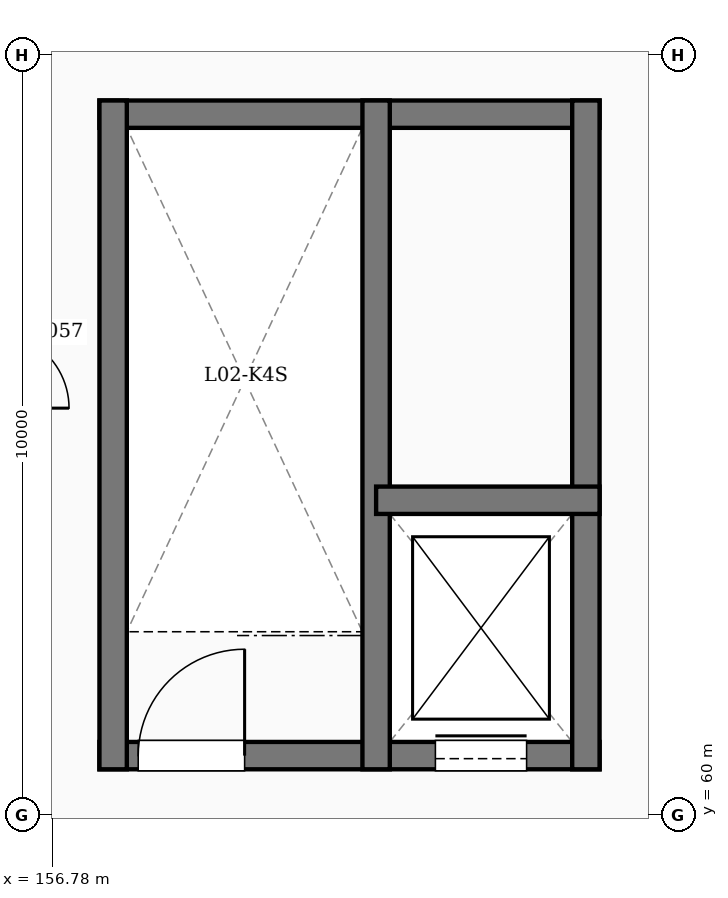
"""IFC4 building model, lengths in metres.
Left out: names, types, materials, properties, quantities, classifications, styles, units other than length and angle.
Written with IfcOpenShell. Run it as: python <this file> out.ifc"""

import sys

from ifc_helpers import new_model, si_unit, direction, frame, frame_2d, origin, place, context, subcontext, project, spatial, rectangle, extrude, element, fill, save


model = new_model("IFC4")
c1 = context("Model", 3, precision=1e-05, world=origin(), true_north=direction((0.0, 1.0)))
c2 = subcontext(c1, "Body", "Model", "MODEL_VIEW")
j1 = project(units=[si_unit("LENGTHUNIT", "METRE"), si_unit("PLANEANGLEUNIT", "RADIAN")], contexts=[c1])
p1 = place(None, origin())
s1 = spatial("IfcSite", under=j1, at=p1, CompositionType="ELEMENT")
p2 = place(p1, origin())
s2 = spatial("IfcBuilding", under=s1, at=p2, CompositionType="ELEMENT")
p3 = place(p2, frame((0.0, 0.0, 10.2)))
s3 = spatial("IfcBuildingStorey", under=s2, at=p3, CompositionType="ELEMENT", Elevation=10.2)
p4 = place(p3, frame((157.4, 60.78, 0.0), z_axis=(0.0, 0.0, 1.0), x_axis=(1.0, 0.0, 0.0)))
e1 = element("IfcWall", 1, at=p4, inside=s3, PredefinedType="SHEAR", context=c2, shape_type="SweptSolid", body=[
    extrude(rectangle(XDim=6.58, YDim=0.36, at=frame_2d((3.29, 0.0))), origin(), (0.0, 0.0, 1.0), 3.65),
])
p5 = place(p4, frame((0.51, 0.0, 0.0)))
e2 = element("IfcOpeningElement", 2, at=p5, cuts=e1, PredefinedType="OPENING", context=c2, shape_type="SweptSolid", body=[
    extrude(rectangle(XDim=1.4, YDim=2.35, at=frame_2d((0.7, 1.175))), frame((0.0, 0.19, 0.0), z_axis=(0.0, -1.0, 0.0), x_axis=(1.0, 0.0, 0.0)), (0.0, 0.0, 1.0), 0.38),
])
p6 = place(p4, frame((4.42, 0.0, 0.0)))
e3 = element("IfcOpeningElement", 3, at=p6, cuts=e1, PredefinedType="OPENING", context=c2, shape_type="SweptSolid", body=[
    extrude(rectangle(XDim=1.2, YDim=2.35, at=frame_2d((0.6, 1.175))), frame((0.0, 0.19, 0.0), z_axis=(0.0, -1.0, 0.0), x_axis=(1.0, 0.0, 0.0)), (0.0, 0.0, 1.0), 0.38),
])
p7 = place(p3, frame((157.4, 69.22, 0.0), z_axis=(0.0, 0.0, 1.0), x_axis=(1.0, 0.0, 0.0)))
e4 = element("IfcWall", 4, at=p7, inside=s3, PredefinedType="SHEAR", context=c2, shape_type="SweptSolid", body=[
    extrude(rectangle(XDim=6.58, YDim=0.36, at=frame_2d((3.29, 0.0))), origin(), (0.0, 0.0, 1.0), 3.65),
])
for number, where, z_axis, x_axis in (
    (5, (157.58, 60.6, 0.0), (0.0, 0.0, 1.0), (0.0, 1.0, 0.0)),
    (6, (163.8, 60.6, 0.0), (0.0, 0.0, 1.0), (0.0, 1.0, 0.0)),
    (7, (161.04, 60.6, 0.0), (0.0, 0.0, 1.0), (0.0, 1.0, 0.0)),
):
    element("IfcWall", number, at=place(p3, frame(where, z_axis=z_axis, x_axis=x_axis)), inside=s3, PredefinedType="SHEAR", context=c2, shape_type="SweptSolid", body=[
        extrude(rectangle(XDim=8.8, YDim=0.36, at=frame_2d((4.4, 0.0))), origin(), (0.0, 0.0, 1.0), 3.65),
    ])
p8 = place(p3, frame((161.04, 64.14, 0.0), z_axis=(0.0, 0.0, 1.0), x_axis=(1.0, 0.0, 0.0)))
e8 = element("IfcWall", 8, at=p8, inside=s3, PredefinedType="SHEAR", context=c2, shape_type="SweptSolid", body=[
    extrude(rectangle(XDim=2.94, YDim=0.36, at=frame_2d((1.47, 0.0))), origin(), (0.0, 0.0, 1.0), 3.65),
])
p9 = place(p5, origin())
e9 = element("IfcDoor", 9, at=p9, inside=s3, OperationType="SINGLE_SWING_RIGHT", PredefinedType="DOOR", context=c2, shape_type="SweptSolid", body=[
    extrude(rectangle(XDim=1.4, YDim=2.35, at=frame_2d((0.7, 1.175))), frame((0.0, 0.025, 0.0), z_axis=(0.0, -1.0, 0.0), x_axis=(1.0, 0.0, 0.0)), (0.0, 0.0, 1.0), 0.05),
])
fill(e2, e9)
p10 = place(p6, origin())
e10 = element("IfcDoor", 10, at=p10, inside=s3, OperationType="SLIDING_TO_LEFT", PredefinedType="DOOR", context=c2, shape_type="SweptSolid", body=[
    extrude(rectangle(XDim=1.2, YDim=2.35, at=frame_2d((0.6, 1.175))), frame((0.0, 0.025, 0.0), z_axis=(0.0, -1.0, 0.0), x_axis=(1.0, 0.0, 0.0)), (0.0, 0.0, 1.0), 0.05),
])
fill(e3, e10)
save(model, sys.argv[1])
